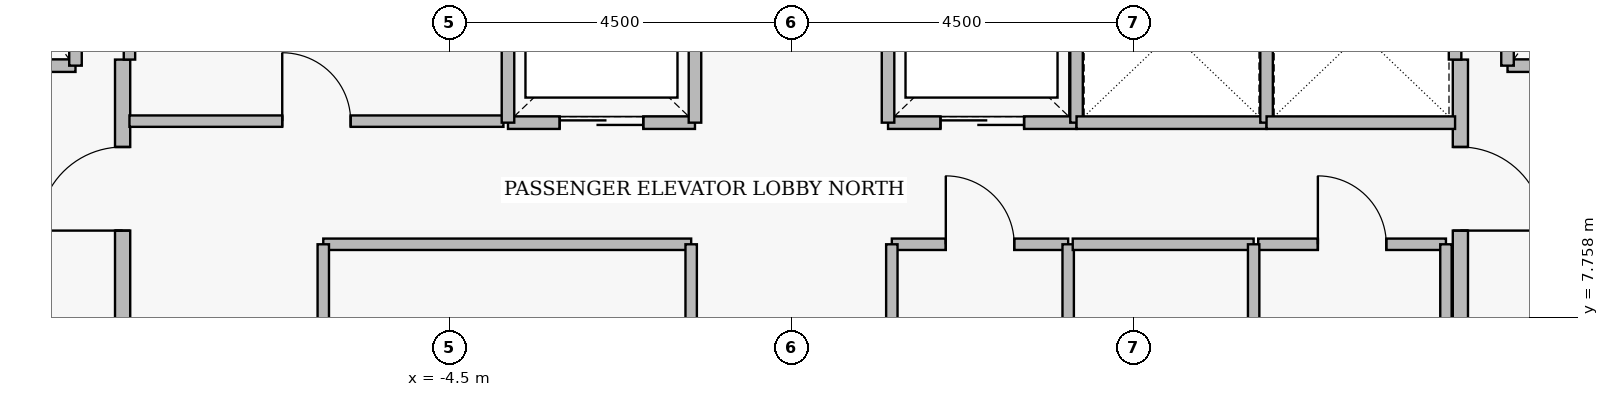
"""IFC4 building model, lengths in metres.
Left out: names, types, materials, properties, quantities, classifications, styles, units other than length and angle.
Written with IfcOpenShell. Run it as: python <this file> out.ifc"""

import sys

from ifc_helpers import new_model, si_unit, direction, frame, frame_2d, origin, place, context, subcontext, project, spatial, rectangle, extrude, element, fill, save


model = new_model("IFC4")
c1 = context("Model", 3, precision=1e-05, world=origin(), true_north=direction((0.0, 1.0)))
c2 = subcontext(c1, "Body", "Model", "MODEL_VIEW")
j1 = project(units=[si_unit("LENGTHUNIT", "METRE"), si_unit("PLANEANGLEUNIT", "RADIAN")], contexts=[c1])
p1 = place(None, origin())
s1 = spatial("IfcSite", under=j1, at=p1, CompositionType="ELEMENT")
p2 = place(p1, origin())
s2 = spatial("IfcBuilding", under=s1, at=p2, CompositionType="ELEMENT")
p3 = place(p2, frame((0.0, 0.0, 177.4)))
s3 = spatial("IfcBuildingStorey", under=s2, at=p3, CompositionType="ELEMENT", Elevation=177.4)
p4 = place(p3, frame((-8.8, 5.05, 0.0), z_axis=(0.0, 0.0, 1.0), x_axis=(0.0, 1.0, 0.0)))
e1 = element("IfcWall", 1, at=p4, inside=s3, PredefinedType="PARTITIONING", context=c2, shape_type="SweptSolid", body=[
    extrude(rectangle(XDim=6.1, YDim=0.2, at=frame_2d((3.05, 0.0))), origin(), (0.0, 0.0, 1.0), 3.53),
])
p5 = place(p4, frame((0.25, 0.0, 0.0)))
e2 = element("IfcOpeningElement", 2, at=p5, cuts=e1, PredefinedType="OPENING", context=c2, shape_type="SweptSolid", body=[
    extrude(rectangle(XDim=1.1, YDim=2.2, at=frame_2d((0.55, 1.1))), frame((0.0, 0.11, 0.0), z_axis=(0.0, -1.0, 0.0), x_axis=(1.0, 0.0, 0.0)), (0.0, 0.0, 1.0), 0.22),
])
p6 = place(p4, frame((3.85, 0.0, 0.0)))
e3 = element("IfcOpeningElement", 3, at=p6, cuts=e1, PredefinedType="OPENING", context=c2, shape_type="SweptSolid", body=[
    extrude(rectangle(XDim=1.1, YDim=2.2, at=frame_2d((0.55, 1.1))), frame((0.0, 0.11, 0.0), z_axis=(0.0, -1.0, 0.0), x_axis=(1.0, 0.0, 0.0)), (0.0, 0.0, 1.0), 0.22),
])
p7 = place(p3, frame((8.8, 11.15, 0.0), z_axis=(0.0, 0.0, 1.0), x_axis=(0.0, -1.0, 0.0)))
e4 = element("IfcWall", 4, at=p7, inside=s3, PredefinedType="PARTITIONING", context=c2, shape_type="SweptSolid", body=[
    extrude(rectangle(XDim=6.1, YDim=0.2, at=frame_2d((3.05, 0.0))), origin(), (0.0, 0.0, 1.0), 3.53),
])
p8 = place(p7, frame((1.15, 0.0, 0.0)))
e5 = element("IfcOpeningElement", 5, at=p8, cuts=e4, PredefinedType="OPENING", context=c2, shape_type="SweptSolid", body=[
    extrude(rectangle(XDim=1.1, YDim=2.2, at=frame_2d((0.55, 1.1))), frame((0.0, 0.11, 0.0), z_axis=(0.0, -1.0, 0.0), x_axis=(1.0, 0.0, 0.0)), (0.0, 0.0, 1.0), 0.22),
])
p9 = place(p7, frame((4.75, 0.0, 0.0)))
e6 = element("IfcOpeningElement", 6, at=p9, cuts=e4, PredefinedType="OPENING", context=c2, shape_type="SweptSolid", body=[
    extrude(rectangle(XDim=1.1, YDim=2.2, at=frame_2d((0.55, 1.1))), frame((0.0, 0.11, 0.0), z_axis=(0.0, -1.0, 0.0), x_axis=(1.0, 0.0, 0.0)), (0.0, 0.0, 1.0), 0.22),
])
p10 = place(p3, frame((-11.58, 11.07, 0.0), z_axis=(0.0, 0.0, 1.0), x_axis=(1.0, 0.0, 0.0)))
e7 = element("IfcWall", 7, at=p10, inside=s3, PredefinedType="PARTITIONING", context=c2, shape_type="SweptSolid", body=[
    extrude(rectangle(XDim=2.16, YDim=0.165, at=frame_2d((1.08, 0.0))), origin(), (0.0, 0.0, 1.0), 3.53),
])
p11 = place(p10, frame((0.53, 0.0, 0.0)))
e8 = element("IfcOpeningElement", 8, at=p11, cuts=e7, PredefinedType="OPENING", context=c2, shape_type="SweptSolid", body=[
    extrude(rectangle(XDim=1.15, YDim=2.25, at=frame_2d((0.575, 1.125))), frame((0.0, 0.093, 0.0), z_axis=(0.0, -1.0, 0.0), x_axis=(1.0, 0.0, 0.0)), (0.0, 0.0, 1.0), 0.185),
])
p12 = place(p3, frame((9.42, 11.07, 0.0), z_axis=(0.0, 0.0, 1.0), x_axis=(1.0, 0.0, 0.0)))
e9 = element("IfcWall", 9, at=p12, inside=s3, PredefinedType="PARTITIONING", context=c2, shape_type="SweptSolid", body=[
    extrude(rectangle(XDim=2.16, YDim=0.165, at=frame_2d((1.08, 0.0))), origin(), (0.0, 0.0, 1.0), 3.53),
])
p13 = place(p12, frame((0.53, 0.0, 0.0)))
e10 = element("IfcOpeningElement", 10, at=p13, cuts=e9, PredefinedType="OPENING", context=c2, shape_type="SweptSolid", body=[
    extrude(rectangle(XDim=1.15, YDim=2.25, at=frame_2d((0.575, 1.125))), frame((0.0, 0.093, 0.0), z_axis=(0.0, -1.0, 0.0), x_axis=(1.0, 0.0, 0.0)), (0.0, 0.0, 1.0), 0.185),
])
p14 = place(p3, frame((-3.73, 10.32, 0.0), z_axis=(0.0, 0.0, 1.0), x_axis=(1.0, 0.0, 0.0)))
e11 = element("IfcWall", 11, at=p14, inside=s3, PredefinedType="PARTITIONING", context=c2, shape_type="SweptSolid", body=[
    extrude(rectangle(XDim=2.46, YDim=0.165, at=frame_2d((1.23, 0.0))), origin(), (0.0, 0.0, 1.0), 3.53),
])
p15 = place(p14, frame((0.68, 0.0, 0.0)))
e12 = element("IfcOpeningElement", 12, at=p15, cuts=e11, PredefinedType="OPENING", context=c2, shape_type="SweptSolid", body=[
    extrude(rectangle(XDim=1.1, YDim=2.25, at=frame_2d((0.55, 1.125))), frame((0.0, 0.093, 0.0), z_axis=(0.0, -1.0, 0.0), x_axis=(1.0, 0.0, 0.0)), (0.0, 0.0, 1.0), 0.185),
])
p16 = place(p3, frame((1.27, 10.32, 0.0), z_axis=(0.0, 0.0, 1.0), x_axis=(1.0, 0.0, 0.0)))
e13 = element("IfcWall", 13, at=p16, inside=s3, PredefinedType="PARTITIONING", context=c2, shape_type="SweptSolid", body=[
    extrude(rectangle(XDim=2.48, YDim=0.165, at=frame_2d((1.24, 0.0))), origin(), (0.0, 0.0, 1.0), 3.53),
])
p17 = place(p16, frame((0.69, 0.0, 0.0)))
e14 = element("IfcOpeningElement", 14, at=p17, cuts=e13, PredefinedType="OPENING", context=c2, shape_type="SweptSolid", body=[
    extrude(rectangle(XDim=1.1, YDim=2.25, at=frame_2d((0.55, 1.125))), frame((0.0, 0.093, 0.0), z_axis=(0.0, -1.0, 0.0), x_axis=(1.0, 0.0, 0.0)), (0.0, 0.0, 1.0), 0.185),
])
p18 = place(p3, frame((-8.71, 10.34, 0.0), z_axis=(0.0, 0.0, 1.0), x_axis=(1.0, 0.0, 0.0)))
e15 = element("IfcWall", 15, at=p18, inside=s3, PredefinedType="PARTITIONING", context=c2, shape_type="SweptSolid", body=[
    extrude(rectangle(XDim=4.92, YDim=0.15, at=frame_2d((2.46, 0.0))), origin(), (0.0, 0.0, 1.0), 3.53),
])
p19 = place(p18, frame((2.01, 0.0, 0.0)))
e16 = element("IfcOpeningElement", 16, at=p19, cuts=e15, PredefinedType="OPENING", context=c2, shape_type="SweptSolid", body=[
    extrude(rectangle(XDim=0.9, YDim=2.15, at=frame_2d((0.45, 1.075))), frame((0.0, 0.085, 0.0), z_axis=(0.0, -1.0, 0.0), x_axis=(1.0, 0.0, 0.0)), (0.0, 0.0, 1.0), 0.17),
])
p20 = place(p3, frame((1.32, 8.72, 0.0), z_axis=(0.0, 0.0, 1.0), x_axis=(1.0, 0.0, 0.0)))
e17 = element("IfcWall", 17, at=p20, inside=s3, PredefinedType="PARTITIONING", context=c2, shape_type="SweptSolid", body=[
    extrude(rectangle(XDim=2.32, YDim=0.15, at=frame_2d((1.16, 0.0))), origin(), (0.0, 0.0, 1.0), 3.53),
])
p21 = place(p20, frame((0.71, 0.0, 0.0)))
e18 = element("IfcOpeningElement", 18, at=p21, cuts=e17, PredefinedType="OPENING", context=c2, shape_type="SweptSolid", body=[
    extrude(rectangle(XDim=0.9, YDim=2.15, at=frame_2d((0.45, 1.075))), frame((0.0, 0.085, 0.0), z_axis=(0.0, -1.0, 0.0), x_axis=(1.0, 0.0, 0.0)), (0.0, 0.0, 1.0), 0.17),
])
p22 = place(p3, frame((6.14, 8.72, 0.0), z_axis=(0.0, 0.0, 1.0), x_axis=(1.0, 0.0, 0.0)))
e19 = element("IfcWall", 19, at=p22, inside=s3, PredefinedType="PARTITIONING", context=c2, shape_type="SweptSolid", body=[
    extrude(rectangle(XDim=2.47, YDim=0.15, at=frame_2d((1.235, 0.0))), origin(), (0.0, 0.0, 1.0), 3.53),
])
p23 = place(p22, frame((0.785, 0.0, 0.0)))
e20 = element("IfcOpeningElement", 20, at=p23, cuts=e19, PredefinedType="OPENING", context=c2, shape_type="SweptSolid", body=[
    extrude(rectangle(XDim=0.9, YDim=2.15, at=frame_2d((0.45, 1.075))), frame((0.0, 0.085, 0.0), z_axis=(0.0, -1.0, 0.0), x_axis=(1.0, 0.0, 0.0)), (0.0, 0.0, 1.0), 0.17),
])
for number, where, z_axis, x_axis in (
    (21, (-9.42, 11.07, 0.0), (0.0, 0.0, 1.0), (0.0, 1.0, 0.0)),
    (22, (9.42, 11.07, 0.0), (0.0, 0.0, 1.0), (0.0, 1.0, 0.0)),
):
    element("IfcWall", number, at=place(p3, frame(where, z_axis=z_axis, x_axis=x_axis)), inside=s3, PredefinedType="PARTITIONING", context=c2, shape_type="SweptSolid", body=[
        extrude(rectangle(XDim=2.96, YDim=0.165, at=frame_2d((1.48, 0.0))), origin(), (0.0, 0.0, 1.0), 3.53),
    ])
for number, where, z_axis, x_axis in (
    (23, (-3.73, 10.32, 0.0), (0.0, 0.0, 1.0), (0.0, 1.0, 0.0)),
    (24, (-1.27, 10.32, 0.0), (0.0, 0.0, 1.0), (0.0, 1.0, 0.0)),
    (25, (1.27, 10.32, 0.0), (0.0, 0.0, 1.0), (0.0, 1.0, 0.0)),
    (26, (3.75, 10.32, 0.0), (0.0, 0.0, 1.0), (0.0, 1.0, 0.0)),
):
    element("IfcWall", number, at=place(p3, frame(where, z_axis=z_axis, x_axis=x_axis)), inside=s3, PredefinedType="PARTITIONING", context=c2, shape_type="SweptSolid", body=[
        extrude(rectangle(XDim=2.36, YDim=0.165, at=frame_2d((1.18, 0.0))), origin(), (0.0, 0.0, 1.0), 3.53),
    ])
p24 = place(p3, frame((3.75, 10.32, 0.0), z_axis=(0.0, 0.0, 1.0), x_axis=(1.0, 0.0, 0.0)))
e27 = element("IfcWall", 27, at=p24, inside=s3, PredefinedType="PARTITIONING", context=c2, shape_type="SweptSolid", body=[
    extrude(rectangle(XDim=2.5, YDim=0.165, at=frame_2d((1.25, 0.0))), origin(), (0.0, 0.0, 1.0), 3.53),
])
p25 = place(p3, frame((6.25, 10.32, 0.0), z_axis=(0.0, 0.0, 1.0), x_axis=(0.0, 1.0, 0.0)))
e28 = element("IfcWall", 28, at=p25, inside=s3, PredefinedType="PARTITIONING", context=c2, shape_type="SweptSolid", body=[
    extrude(rectangle(XDim=2.36, YDim=0.165, at=frame_2d((1.18, 0.0))), origin(), (0.0, 0.0, 1.0), 3.53),
])
p26 = place(p3, frame((6.25, 10.32, 0.0), z_axis=(0.0, 0.0, 1.0), x_axis=(1.0, 0.0, 0.0)))
e29 = element("IfcWall", 29, at=p26, inside=s3, PredefinedType="PARTITIONING", context=c2, shape_type="SweptSolid", body=[
    extrude(rectangle(XDim=2.48, YDim=0.165, at=frame_2d((1.24, 0.0))), origin(), (0.0, 0.0, 1.0), 3.53),
])
p27 = place(p3, frame((8.73, 11.15, 0.0), z_axis=(0.0, 0.0, 1.0), x_axis=(0.0, 1.0, 0.0)))
e30 = element("IfcWall", 30, at=p27, inside=s3, PredefinedType="PARTITIONING", context=c2, shape_type="SweptSolid", body=[
    extrude(rectangle(XDim=1.53, YDim=0.165, at=frame_2d((0.765, 0.0))), origin(), (0.0, 0.0, 1.0), 3.53),
])
p28 = place(p3, frame((-8.71, 11.15, 0.0), z_axis=(0.0, 0.0, 1.0), x_axis=(0.0, 1.0, 0.0)))
e31 = element("IfcWall", 31, at=p28, inside=s3, PredefinedType="PARTITIONING", context=c2, shape_type="SweptSolid", body=[
    extrude(rectangle(XDim=1.71, YDim=0.15, at=frame_2d((0.855, 0.0))), origin(), (0.0, 0.0, 1.0), 3.53),
])
p29 = place(p3, frame((-6.16, 8.72, 0.0), z_axis=(0.0, 0.0, 1.0), x_axis=(1.0, 0.0, 0.0)))
e32 = element("IfcWall", 32, at=p29, inside=s3, PredefinedType="PARTITIONING", context=c2, shape_type="SweptSolid", body=[
    extrude(rectangle(XDim=4.84, YDim=0.15, at=frame_2d((2.42, 0.0))), origin(), (0.0, 0.0, 1.0), 3.53),
])
for number, where, z_axis, x_axis in (
    (33, (-6.16, 6.48, 0.0), (0.0, 0.0, 1.0), (0.0, 1.0, 0.0)),
    (34, (-1.32, 6.48, 0.0), (0.0, 0.0, 1.0), (0.0, 1.0, 0.0)),
    (35, (1.32, 6.48, 0.0), (0.0, 0.0, 1.0), (0.0, 1.0, 0.0)),
    (36, (3.64, 6.48, 0.0), (0.0, 0.0, 1.0), (0.0, 1.0, 0.0)),
):
    element("IfcWall", number, at=place(p3, frame(where, z_axis=z_axis, x_axis=x_axis)), inside=s3, PredefinedType="PARTITIONING", context=c2, shape_type="SweptSolid", body=[
        extrude(rectangle(XDim=2.24, YDim=0.15, at=frame_2d((1.12, 0.0))), origin(), (0.0, 0.0, 1.0), 3.53),
    ])
p30 = place(p3, frame((3.7, 8.72, 0.0), z_axis=(0.0, 0.0, 1.0), x_axis=(1.0, 0.0, 0.0)))
e37 = element("IfcWall", 37, at=p30, inside=s3, PredefinedType="PARTITIONING", context=c2, shape_type="SweptSolid", body=[
    extrude(rectangle(XDim=2.38, YDim=0.15, at=frame_2d((1.19, 0.0))), origin(), (0.0, 0.0, 1.0), 3.53),
])
for number, where, z_axis, x_axis in (
    (38, (6.08, 6.48, 0.0), (0.0, 0.0, 1.0), (0.0, 1.0, 0.0)),
    (39, (8.61, 6.48, 0.0), (0.0, 0.0, 1.0), (0.0, 1.0, 0.0)),
):
    element("IfcWall", number, at=place(p3, frame(where, z_axis=z_axis, x_axis=x_axis)), inside=s3, PredefinedType="PARTITIONING", context=c2, shape_type="SweptSolid", body=[
        extrude(rectangle(XDim=2.24, YDim=0.15, at=frame_2d((1.12, 0.0))), origin(), (0.0, 0.0, 1.0), 3.53),
    ])
p31 = place(p6, origin())
e40 = element("IfcDoor", 40, at=p31, inside=s3, OperationType="SINGLE_SWING_LEFT", PredefinedType="DOOR", context=c2, shape_type="SweptSolid", body=[
    extrude(rectangle(XDim=1.1, YDim=2.2, at=frame_2d((0.55, 1.1))), frame((0.0, 0.025, 0.0), z_axis=(0.0, -1.0, 0.0), x_axis=(1.0, 0.0, 0.0)), (0.0, 0.0, 1.0), 0.05),
])
fill(e3, e40)
p32 = place(p8, origin())
e41 = element("IfcDoor", 41, at=p32, inside=s3, OperationType="SINGLE_SWING_RIGHT", PredefinedType="DOOR", context=c2, shape_type="SweptSolid", body=[
    extrude(rectangle(XDim=1.1, YDim=2.2, at=frame_2d((0.55, 1.1))), frame((0.0, 0.025, 0.0), z_axis=(0.0, -1.0, 0.0), x_axis=(1.0, 0.0, 0.0)), (0.0, 0.0, 1.0), 0.05),
])
fill(e5, e41)
p33 = place(p15, origin())
e42 = element("IfcDoor", 42, at=p33, inside=s3, OperationType="SLIDING_TO_LEFT", PredefinedType="DOOR", context=c2, shape_type="SweptSolid", body=[
    extrude(rectangle(XDim=1.1, YDim=2.25, at=frame_2d((0.55, 1.125))), frame((0.0, 0.025, 0.0), z_axis=(0.0, -1.0, 0.0), x_axis=(1.0, 0.0, 0.0)), (0.0, 0.0, 1.0), 0.05),
])
fill(e12, e42)
p34 = place(p17, origin())
e43 = element("IfcDoor", 43, at=p34, inside=s3, OperationType="SLIDING_TO_LEFT", PredefinedType="DOOR", context=c2, shape_type="SweptSolid", body=[
    extrude(rectangle(XDim=1.1, YDim=2.25, at=frame_2d((0.55, 1.125))), frame((0.0, 0.025, 0.0), z_axis=(0.0, -1.0, 0.0), x_axis=(1.0, 0.0, 0.0)), (0.0, 0.0, 1.0), 0.05),
])
fill(e14, e43)
p35 = place(p19, origin())
e44 = element("IfcDoor", 44, at=p35, inside=s3, OperationType="SINGLE_SWING_LEFT", PredefinedType="DOOR", context=c2, shape_type="SweptSolid", body=[
    extrude(rectangle(XDim=0.9, YDim=2.15, at=frame_2d((0.45, 1.075))), frame((0.0, 0.025, 0.0), z_axis=(0.0, -1.0, 0.0), x_axis=(1.0, 0.0, 0.0)), (0.0, 0.0, 1.0), 0.05),
])
fill(e16, e44)
p36 = place(p21, origin())
e45 = element("IfcDoor", 45, at=p36, inside=s3, OperationType="SINGLE_SWING_LEFT", PredefinedType="DOOR", context=c2, shape_type="SweptSolid", body=[
    extrude(rectangle(XDim=0.9, YDim=2.15, at=frame_2d((0.45, 1.075))), frame((0.0, 0.025, 0.0), z_axis=(0.0, -1.0, 0.0), x_axis=(1.0, 0.0, 0.0)), (0.0, 0.0, 1.0), 0.05),
])
fill(e18, e45)
p37 = place(p23, origin())
e46 = element("IfcDoor", 46, at=p37, inside=s3, OperationType="SINGLE_SWING_LEFT", PredefinedType="DOOR", context=c2, shape_type="SweptSolid", body=[
    extrude(rectangle(XDim=0.9, YDim=2.15, at=frame_2d((0.45, 1.075))), frame((0.0, 0.025, 0.0), z_axis=(0.0, -1.0, 0.0), x_axis=(1.0, 0.0, 0.0)), (0.0, 0.0, 1.0), 0.05),
])
fill(e20, e46)
save(model, sys.argv[1])
